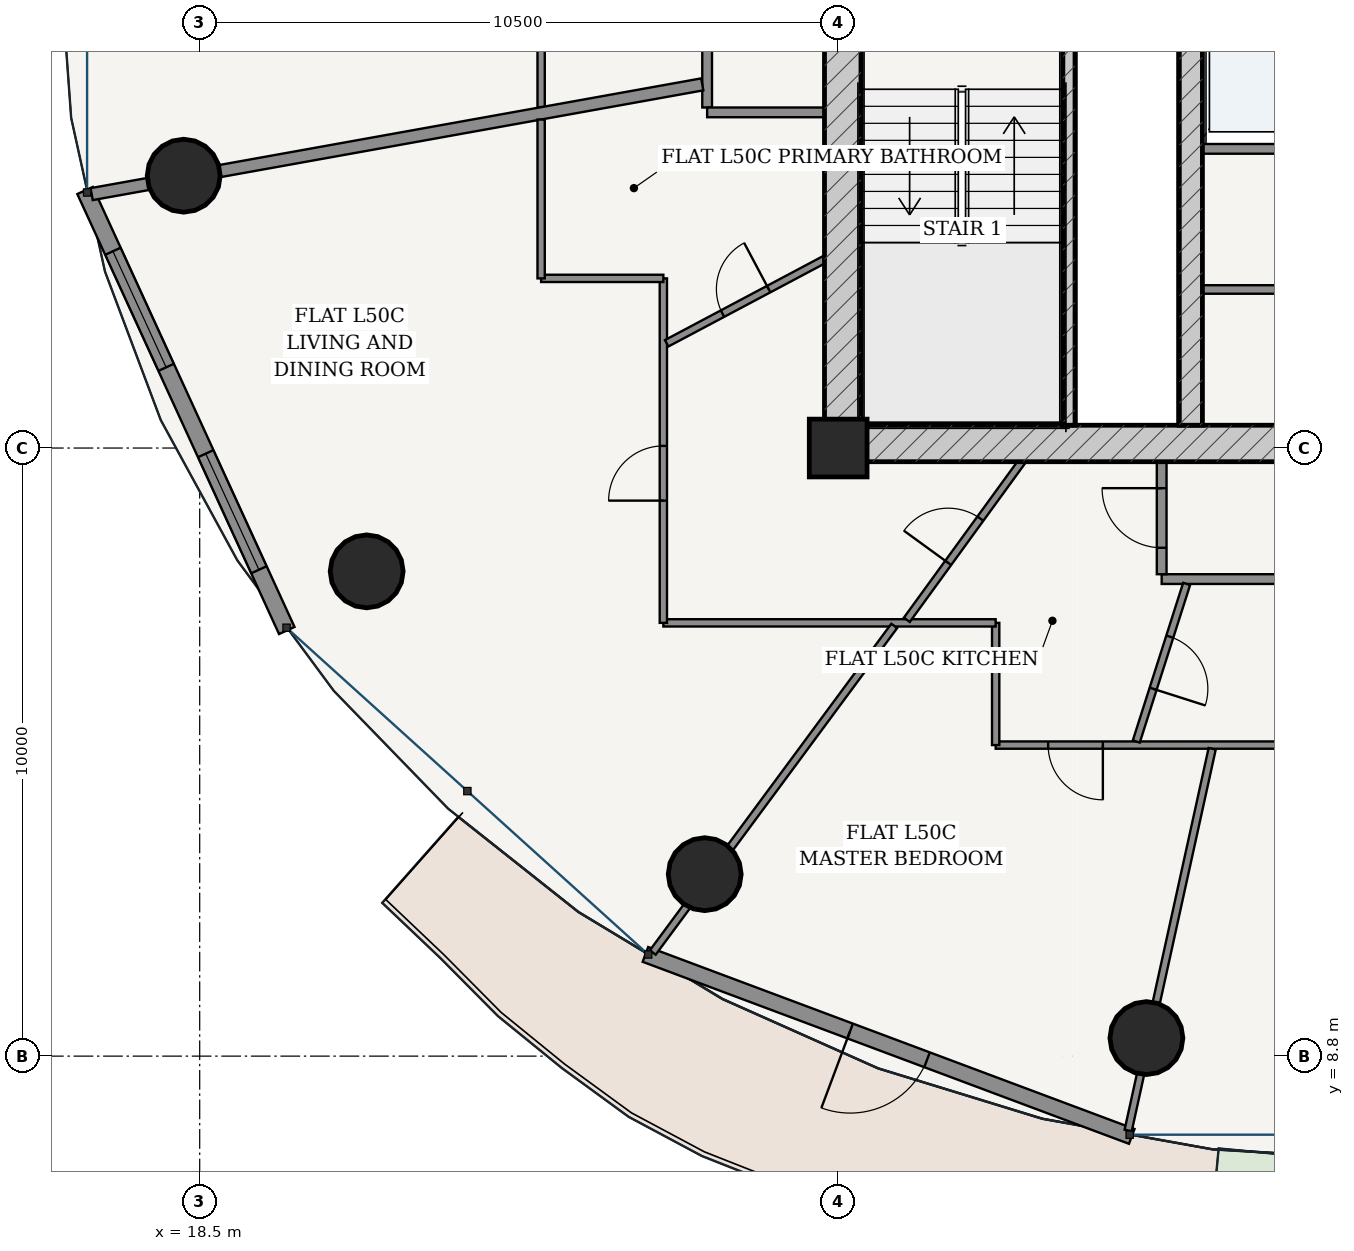
"""IFC4 building model, lengths in metres.
Left out: names, types, materials, properties, quantities, classifications, styles, units other than length and angle.
Written with IfcOpenShell. Run it as: python <this file> out.ifc"""

import sys

from ifc_helpers import new_model, si_unit, direction, frame, frame_2d, origin, origin_2d, place, context, subcontext, project, spatial, rectangle, hollow_circle, extrude, source, transform, mapped, element, fill, save


model = new_model("IFC4")
c1 = context("Model", 3, precision=1e-05, world=origin(), true_north=direction((-0.2419218956, 0.970295726276)))
c2 = subcontext(c1, "Body", "Model", "MODEL_VIEW")
j1 = project(units=[si_unit("LENGTHUNIT", "METRE"), si_unit("PLANEANGLEUNIT", "RADIAN")], contexts=[c1])
p1 = place(None, origin())
s1 = spatial("IfcSite", under=j1, at=p1, CompositionType="ELEMENT")
p2 = place(p1, origin())
s2 = spatial("IfcBuilding", under=s1, at=p2, CompositionType="ELEMENT")
p3 = place(p2, frame((0.0, 0.0, 191.2)))
s3 = spatial("IfcBuildingStorey", under=s2, at=p3, CompositionType="ELEMENT", Elevation=191.2)
p4 = place(p3, frame((29.0, 18.8, 0.0), z_axis=(0.0, 0.0, 1.0), x_axis=(1.0, 0.0, 0.0)))
e1 = element("IfcColumn", 1, at=p4, inside=s3, PredefinedType="COLUMN", context=c2, shape_type="SweptSolid", body=[
    extrude(rectangle(XDim=0.95, YDim=0.95, at=origin_2d()), origin(), (0.0, 0.0, 1.0), 3.7),
])
p5 = place(p3, frame((28.775, 18.875, 0.0), z_axis=(0.0, 0.0, 1.0), x_axis=(1.0, 0.0, 0.0)))
e2 = element("IfcWall", 2, at=p5, inside=s3, PredefinedType="SHEAR", context=c2, shape_type="SweptSolid", body=[
    extrude(rectangle(XDim=18.45, YDim=0.6, at=frame_2d((9.225, 0.0))), origin(), (0.0, 0.0, 1.0), 3.435),
])
p6 = place(p5, frame((8.8, 0.0, 0.0)))
e3 = element("IfcOpeningElement", 3, at=p6, cuts=e2, PredefinedType="OPENING", context=c2, shape_type="SweptSolid", body=[
    extrude(rectangle(XDim=0.85, YDim=2.1, at=frame_2d((0.425, 1.05))), frame((0.0, 0.31, 0.0), z_axis=(0.0, -1.0, 0.0), x_axis=(1.0, 0.0, 0.0)), (0.0, 0.0, 1.0), 0.62),
])
p7 = place(p3, frame((29.075, 19.175, 0.0), z_axis=(0.0, 0.0, 1.0), x_axis=(0.0, 1.0, 0.0)))
e4 = element("IfcWall", 4, at=p7, inside=s3, PredefinedType="SHEAR", context=c2, shape_type="SweptSolid", body=[
    extrude(rectangle(XDim=15.25, YDim=0.6, at=frame_2d((7.625, 0.0))), origin(), (0.0, 0.0, 1.0), 3.435),
])
p8 = place(p7, frame((9.875, 0.0, 0.0)))
e5 = element("IfcOpeningElement", 5, at=p8, cuts=e4, PredefinedType="OPENING", context=c2, shape_type="SweptSolid", body=[
    extrude(rectangle(XDim=1.5, YDim=2.2, at=frame_2d((0.75, 1.1))), frame((0.0, 0.31, 0.0), z_axis=(0.0, -1.0, 0.0), x_axis=(1.0, 0.0, 0.0)), (0.0, 0.0, 1.0), 0.62),
])
p9 = place(p3, frame((32.795, 19.175, 0.0), z_axis=(0.0, 0.0, 1.0), x_axis=(0.0, 1.0, 0.0)))
e6 = element("IfcWall", 6, at=p9, inside=s3, PredefinedType="SOLIDWALL", context=c2, shape_type="SweptSolid", body=[
    extrude(rectangle(XDim=7.375, YDim=0.2, at=frame_2d((3.688, 0.0))), origin(), (0.0, 0.0, 1.0), 3.435),
])
p10 = place(p3, frame((34.8, 19.175, 0.0), z_axis=(0.0, 0.0, 1.0), x_axis=(0.0, 1.0, 0.0)))
e7 = element("IfcWall", 7, at=p10, inside=s3, PredefinedType="SHEAR", context=c2, shape_type="SweptSolid", body=[
    extrude(rectangle(XDim=15.25, YDim=0.38, at=frame_2d((7.625, 0.0))), origin(), (0.0, 0.0, 1.0), 3.435),
])
p11 = place(p10, frame((7.8, 0.0, 0.0)))
e8 = element("IfcOpeningElement", 8, at=p11, cuts=e7, PredefinedType="OPENING", context=c2, shape_type="SweptSolid", body=[
    extrude(rectangle(XDim=1.05, YDim=2.15, at=frame_2d((0.525, 1.075))), frame((0.0, 0.2, 0.0), z_axis=(0.0, -1.0, 0.0), x_axis=(1.0, 0.0, 0.0)), (0.0, 0.0, 1.0), 0.4),
])
for number, where, z_axis, x_axis in (
    (9, (18.237, 23.279, 0.0), (0.0, 0.0, 1.0), (1.0, 0.0, 0.0)),
    (10, (21.246, 16.772, 0.0), (0.0, 0.0, 1.0), (1.0, 0.0, 0.0)),
    (11, (26.805, 11.792, 0.0), (0.0, 0.0, 1.0), (1.0, 0.0, 0.0)),
    (12, (34.069, 9.097, 0.0), (0.0, 0.0, 1.0), (1.0, 0.0, 0.0)),
):
    element("IfcColumn", number, at=place(p3, frame(where, z_axis=z_axis, x_axis=x_axis)), inside=s3, PredefinedType="COLUMN", context=c2, shape_type="SweptSolid", body=[
        extrude(hollow_circle(Radius=0.6, WallThickness=0.038, at=origin_2d()), origin(), (0.0, 0.0, 1.0), 3.7),
    ])
p12 = place(p3, frame((16.615, 23.035, 0.0), z_axis=(0.0, 0.0, 1.0), x_axis=(0.416717018135, -0.909036262641, 0.0)))
e13 = element("IfcWall", 13, at=p12, inside=s3, PredefinedType="SOLIDWALL", context=c2, shape_type="SweptSolid", body=[
    extrude(rectangle(XDim=7.96, YDim=0.28, at=frame_2d((3.98, 0.0))), origin(), (0.0, 0.0, 1.0), 3.435),
])
p13 = place(p12, frame((1.099, 0.0, 0.85)))
e14 = element("IfcOpeningElement", 14, at=p13, cuts=e13, PredefinedType="OPENING", context=c2, shape_type="SweptSolid", body=[
    extrude(rectangle(XDim=2.1, YDim=1.95, at=frame_2d((1.05, 0.975))), frame((0.0, 0.15, 0.0), z_axis=(0.0, -1.0, 0.0), x_axis=(1.0, 0.0, 0.0)), (0.0, 0.0, 1.0), 0.3),
])
p14 = place(p12, frame((4.761, 0.0, 0.85)))
e15 = element("IfcOpeningElement", 15, at=p14, cuts=e13, PredefinedType="OPENING", context=c2, shape_type="SweptSolid", body=[
    extrude(rectangle(XDim=2.1, YDim=1.95, at=frame_2d((1.05, 0.975))), frame((0.0, 0.15, 0.0), z_axis=(0.0, -1.0, 0.0), x_axis=(1.0, 0.0, 0.0)), (0.0, 0.0, 1.0), 0.3),
])
p15 = place(p3, frame((25.83, 10.473, 0.0), z_axis=(0.0, 0.0, 1.0), x_axis=(0.936556918375, -0.350515532672, 0.0)))
e16 = element("IfcWall", 16, at=p15, inside=s3, PredefinedType="SOLIDWALL", context=c2, shape_type="SweptSolid", body=[
    extrude(rectangle(XDim=8.539, YDim=0.26, at=frame_2d((4.27, 0.0))), origin(), (0.0, 0.0, 1.0), 3.435),
])
p16 = place(p15, frame((3.594, 0.0, 0.0)))
e17 = element("IfcOpeningElement", 17, at=p16, cuts=e16, PredefinedType="OPENING", context=c2, shape_type="SweptSolid", body=[
    extrude(rectangle(XDim=1.35, YDim=2.2, at=frame_2d((0.675, 1.1))), frame((0.0, 0.14, 0.0), z_axis=(0.0, -1.0, 0.0), x_axis=(1.0, 0.0, 0.0)), (0.0, 0.0, 1.0), 0.28),
])
p17 = place(p3, frame((34.99, 23.72, 0.0), z_axis=(0.0, 0.0, 1.0), x_axis=(1.0, 0.0, 0.0)))
e18 = element("IfcWall", 18, at=p17, inside=s3, PredefinedType="PARTITIONING", context=c2, shape_type="SweptSolid", body=[
    extrude(rectangle(XDim=6.02, YDim=0.16, at=frame_2d((3.01, 0.0))), origin(), (0.0, 0.0, 1.0), 3.435),
])
p18 = place(p3, frame((34.99, 21.407, 0.0), z_axis=(0.0, 0.0, 1.0), x_axis=(1.0, 0.0, 0.0)))
e19 = element("IfcWall", 19, at=p18, inside=s3, PredefinedType="PARTITIONING", context=c2, shape_type="SweptSolid", body=[
    extrude(rectangle(XDim=6.02, YDim=0.14, at=frame_2d((3.01, 0.0))), origin(), (0.0, 0.0, 1.0), 3.435),
])
p19 = place(p18, frame((2.585, 0.0, 0.0)))
e20 = element("IfcOpeningElement", 20, at=p19, cuts=e19, PredefinedType="OPENING", context=c2, shape_type="SweptSolid", body=[
    extrude(rectangle(XDim=0.85, YDim=2.1, at=frame_2d((0.425, 1.05))), frame((0.0, 0.08, 0.0), z_axis=(0.0, -1.0, 0.0), x_axis=(1.0, 0.0, 0.0)), (0.0, 0.0, 1.0), 0.16),
])
p20 = place(p3, frame((26.845, 24.4, 0.0), z_axis=(0.0, 0.0, 1.0), x_axis=(0.0, 1.0, 0.0)))
e21 = element("IfcWall", 21, at=p20, inside=s3, PredefinedType="PARTITIONING", context=c2, shape_type="SweptSolid", body=[
    extrude(rectangle(XDim=10.625, YDim=0.16, at=frame_2d((5.312, 0.0))), origin(), (0.0, 0.0, 1.0), 2.951),
])
p21 = place(p3, frame((26.845, 24.32, 0.0), z_axis=(0.0, 0.0, 1.0), x_axis=(1.0, 0.0, 0.0)))
e22 = element("IfcWall", 22, at=p21, inside=s3, PredefinedType="PARTITIONING", context=c2, shape_type="SweptSolid", body=[
    extrude(rectangle(XDim=1.93, YDim=0.16, at=frame_2d((0.965, 0.0))), origin(), (0.0, 0.0, 1.0), 3.435),
])
p22 = place(p3, frame((34.32, 16.645, 0.0), z_axis=(0.0, 0.0, 1.0), x_axis=(1.0, 0.0, 0.0)))
e23 = element("IfcWall", 23, at=p22, inside=s3, PredefinedType="PARTITIONING", context=c2, shape_type="SweptSolid", body=[
    extrude(rectangle(XDim=14.835, YDim=0.16, at=frame_2d((7.417, 0.0))), origin(), (0.0, 0.0, 1.0), 2.951),
])
p23 = place(p22, frame((11.961, 0.0, 0.0)))
e24 = element("IfcOpeningElement", 24, at=p23, cuts=e23, PredefinedType="OPENING", context=c2, shape_type="SweptSolid", body=[
    extrude(rectangle(XDim=0.98, YDim=2.2, at=frame_2d((0.49, 1.1))), frame((0.0, 0.09, 0.0), z_axis=(0.0, -1.0, 0.0), x_axis=(1.0, 0.0, 0.0)), (0.0, 0.0, 1.0), 0.18),
])
p24 = place(p3, frame((34.32, 16.725, 0.0), z_axis=(0.0, 0.0, 1.0), x_axis=(0.0, 1.0, 0.0)))
e25 = element("IfcWall", 25, at=p24, inside=s3, PredefinedType="PARTITIONING", context=c2, shape_type="SweptSolid", body=[
    extrude(rectangle(XDim=1.85, YDim=0.16, at=frame_2d((0.925, 0.0))), origin(), (0.0, 0.0, 1.0), 3.435),
])
p25 = place(p24, frame((0.435, 0.0, 0.0)))
e26 = element("IfcOpeningElement", 26, at=p25, cuts=e25, PredefinedType="OPENING", context=c2, shape_type="SweptSolid", body=[
    extrude(rectangle(XDim=0.98, YDim=2.2, at=frame_2d((0.49, 1.1))), frame((0.0, 0.09, 0.0), z_axis=(0.0, -1.0, 0.0), x_axis=(1.0, 0.0, 0.0)), (0.0, 0.0, 1.0), 0.18),
])
p26 = place(p3, frame((24.115, 24.406, 0.0), z_axis=(0.0, 0.0, 1.0), x_axis=(0.0, 1.0, 0.0)))
e27 = element("IfcWall", 27, at=p26, inside=s3, PredefinedType="PARTITIONING", context=c2, shape_type="SweptSolid", body=[
    extrude(rectangle(XDim=13.429, YDim=0.12, at=frame_2d((6.714, 0.0))), origin(), (0.0, 0.0, 1.0), 2.951),
])
p27 = place(p26, frame((9.641, 0.0, 0.0)))
e28 = element("IfcOpeningElement", 28, at=p27, cuts=e27, PredefinedType="OPENING", context=c2, shape_type="SweptSolid", body=[
    extrude(rectangle(XDim=0.9, YDim=2.15, at=frame_2d((0.45, 1.075))), frame((0.0, 0.07, 0.0), z_axis=(0.0, -1.0, 0.0), x_axis=(1.0, 0.0, 0.0)), (0.0, 0.0, 1.0), 0.14),
])
p28 = place(p3, frame((26.765, 24.781, 0.0), z_axis=(0.0, 0.0, 1.0), x_axis=(-0.984226684914, -0.176911934879, 0.0)))
e29 = element("IfcWall", 29, at=p28, inside=s3, PredefinedType="PARTITIONING", context=c2, shape_type="SweptSolid", body=[
    extrude(rectangle(XDim=10.202, YDim=0.2, at=frame_2d((5.101, 0.0))), origin(), (0.0, 0.0, 1.0), 2.951),
])
p29 = place(p3, frame((40.734, 13.915, 0.0), z_axis=(0.0, 0.0, 1.0), x_axis=(-1.0, 0.0, 0.0)))
e30 = element("IfcWall", 30, at=p29, inside=s3, PredefinedType="PARTITIONING", context=c2, shape_type="SweptSolid", body=[
    extrude(rectangle(XDim=9.144, YDim=0.12, at=frame_2d((4.572, 0.0))), origin(), (0.0, 0.0, 1.0), 2.951),
])
p30 = place(p29, frame((7.381, 0.0, 0.0)))
e31 = element("IfcOpeningElement", 31, at=p30, cuts=e30, PredefinedType="OPENING", context=c2, shape_type="SweptSolid", body=[
    extrude(rectangle(XDim=0.9, YDim=2.15, at=frame_2d((0.45, 1.075))), frame((0.0, 0.07, 0.0), z_axis=(0.0, -1.0, 0.0), x_axis=(1.0, 0.0, 0.0)), (0.0, 0.0, 1.0), 0.14),
])
p31 = place(p29, frame((2.458, 0.0, 0.0)))
e32 = element("IfcOpeningElement", 32, at=p31, cuts=e30, PredefinedType="OPENING", context=c2, shape_type="SweptSolid", body=[
    extrude(rectangle(XDim=0.9, YDim=2.15, at=frame_2d((0.45, 1.075))), frame((0.0, 0.07, 0.0), z_axis=(0.0, -1.0, 0.0), x_axis=(1.0, 0.0, 0.0)), (0.0, 0.0, 1.0), 0.14),
])
p32 = place(p3, frame((31.59, 13.915, 0.0), z_axis=(0.0, 0.0, 1.0), x_axis=(0.0, 1.0, 0.0)))
e33 = element("IfcWall", 33, at=p32, inside=s3, PredefinedType="PARTITIONING", context=c2, shape_type="SweptSolid", body=[
    extrude(rectangle(XDim=2.01, YDim=0.12, at=frame_2d((1.005, 0.0))), origin(), (0.0, 0.0, 1.0), 3.11),
])
p33 = place(p3, frame((31.59, 15.925, 0.0), z_axis=(0.0, 0.0, 1.0), x_axis=(-1.0, 0.0, 0.0)))
e34 = element("IfcWall", 34, at=p33, inside=s3, PredefinedType="PARTITIONING", context=c2, shape_type="SweptSolid", body=[
    extrude(rectangle(XDim=5.465, YDim=0.12, at=frame_2d((2.732, 0.0))), origin(), (0.0, 0.0, 1.0), 2.951),
])
p34 = place(p3, frame((26.125, 15.925, 0.0), z_axis=(0.0, 0.0, 1.0), x_axis=(0.0, 1.0, 0.0)))
e35 = element("IfcWall", 35, at=p34, inside=s3, PredefinedType="PARTITIONING", context=c2, shape_type="SweptSolid", body=[
    extrude(rectangle(XDim=5.665, YDim=0.12, at=frame_2d((2.833, 0.0))), origin(), (0.0, 0.0, 1.0), 2.951),
])
p35 = place(p34, frame((2.01, 0.0, 0.0)))
e36 = element("IfcOpeningElement", 36, at=p35, cuts=e35, PredefinedType="OPENING", context=c2, shape_type="SweptSolid", body=[
    extrude(rectangle(XDim=0.9, YDim=2.15, at=frame_2d((0.45, 1.075))), frame((0.0, 0.07, 0.0), z_axis=(0.0, -1.0, 0.0), x_axis=(1.0, 0.0, 0.0)), (0.0, 0.0, 1.0), 0.14),
])
p36 = place(p3, frame((26.125, 21.59, 0.0), z_axis=(0.0, 0.0, 1.0), x_axis=(-1.0, 0.0, 0.0)))
e37 = element("IfcWall", 37, at=p36, inside=s3, PredefinedType="PARTITIONING", context=c2, shape_type="SweptSolid", body=[
    extrude(rectangle(XDim=2.01, YDim=0.12, at=frame_2d((1.005, 0.0))), origin(), (0.0, 0.0, 1.0), 3.11),
])
p37 = place(p3, frame((24.115, 21.59, 0.0), z_axis=(0.0, 0.0, 1.0), x_axis=(0.0, 1.0, 0.0)))
e38 = element("IfcWall", 38, at=p37, inside=s3, PredefinedType="PARTITIONING", context=c2, shape_type="SweptSolid", body=[
    extrude(rectangle(XDim=2.612, YDim=0.12, at=frame_2d((1.306, 0.0))), origin(), (0.0, 0.0, 1.0), 3.11),
])
p38 = place(p3, frame((29.922, 15.875, 0.0), z_axis=(0.0, 0.0, 1.0), x_axis=(-0.594524636617, -0.804077394568, 0.0)))
e39 = element("IfcWall", 39, at=p38, inside=s3, PredefinedType="PARTITIONING", context=c2, shape_type="SweptSolid", body=[
    extrude(rectangle(XDim=6.68, YDim=0.12, at=frame_2d((3.34, 0.0))), origin(), (0.0, 0.0, 1.0), 2.951),
])
p39 = place(p3, frame((35.15, 13.854, 0.0), z_axis=(0.0, 0.0, 1.0), x_axis=(-0.214942949264, -0.976626606519, 0.0)))
e40 = element("IfcWall", 40, at=p39, inside=s3, PredefinedType="PARTITIONING", context=c2, shape_type="SweptSolid", body=[
    extrude(rectangle(XDim=6.427, YDim=0.12, at=frame_2d((3.213, 0.0))), origin(), (0.0, 0.0, 1.0), 2.951),
])
p40 = place(p3, frame((28.775, 21.901, 0.0), z_axis=(0.0, 0.0, 1.0), x_axis=(-0.883156592468, -0.46907828044, 0.0)))
e41 = element("IfcWall", 41, at=p40, inside=s3, PredefinedType="PARTITIONING", context=c2, shape_type="SweptSolid", body=[
    extrude(rectangle(XDim=2.938, YDim=0.12, at=frame_2d((1.469, 0.0))), origin(), (0.0, 0.0, 1.0), 3.435),
])
p41 = place(p40, frame((1.039, 0.0, 0.0)))
e42 = element("IfcOpeningElement", 42, at=p41, cuts=e41, PredefinedType="OPENING", context=c2, shape_type="SweptSolid", body=[
    extrude(rectangle(XDim=0.86, YDim=2.15, at=frame_2d((0.43, 1.075))), frame((0.0, 0.07, 0.0), z_axis=(0.0, -1.0, 0.0), x_axis=(1.0, 0.0, 0.0)), (0.0, 0.0, 1.0), 0.14),
])
p42 = place(p3, frame((32.019, 18.575, 0.0), z_axis=(0.0, 0.0, 1.0), x_axis=(-0.588135570825, -0.808762357143, 0.0)))
e43 = element("IfcWall", 43, at=p42, inside=s3, PredefinedType="PARTITIONING", context=c2, shape_type="SweptSolid", body=[
    extrude(rectangle(XDim=3.215, YDim=0.12, at=frame_2d((1.607, 0.0))), origin(), (0.0, 0.0, 1.0), 3.435),
])
p43 = place(p42, frame((1.157, 0.0, 0.0)))
e44 = element("IfcOpeningElement", 44, at=p43, cuts=e43, PredefinedType="OPENING", context=c2, shape_type="SweptSolid", body=[
    extrude(rectangle(XDim=0.9, YDim=2.15, at=frame_2d((0.45, 1.075))), frame((0.0, 0.07, 0.0), z_axis=(0.0, -1.0, 0.0), x_axis=(1.0, 0.0, 0.0)), (0.0, 0.0, 1.0), 0.14),
])
p44 = place(p3, frame((34.73, 16.565, 0.0), z_axis=(0.0, 0.0, 1.0), x_axis=(-0.304300161081, -0.952576197459, 0.0)))
e45 = element("IfcWall", 45, at=p44, inside=s3, PredefinedType="PARTITIONING", context=c2, shape_type="SweptSolid", body=[
    extrude(rectangle(XDim=2.72, YDim=0.12, at=frame_2d((1.36, 0.0))), origin(), (0.0, 0.0, 1.0), 3.11),
])
p45 = place(p44, frame((0.91, 0.0, 0.0)))
e46 = element("IfcOpeningElement", 46, at=p45, cuts=e45, PredefinedType="OPENING", context=c2, shape_type="SweptSolid", body=[
    extrude(rectangle(XDim=0.9, YDim=2.15, at=frame_2d((0.45, 1.075))), frame((0.0, 0.07, 0.0), z_axis=(0.0, -1.0, 0.0), x_axis=(1.0, 0.0, 0.0)), (0.0, 0.0, 1.0), 0.14),
])
m1 = source(origin(), c2, "Body", "SweptSolid", [
    extrude(rectangle(XDim=2.1, YDim=1.95, at=frame_2d((1.05, 0.975))), frame((0.0, 0.03, 0.0), z_axis=(0.0, -1.0, 0.0), x_axis=(1.0, 0.0, 0.0)), (0.0, 0.0, 1.0), 0.06),
])
p46 = place(p13, origin())
e47 = element("IfcWindow", 47, at=p46, inside=s3, PartitioningType="SINGLE_PANEL", PredefinedType="WINDOW", context=c2, shape_type="MappedRepresentation", body=[
    mapped(m1, transform((0.0, 0.0, 0.0), scale=1.0)),
])
fill(e14, e47)
p47 = place(p14, origin())
e48 = element("IfcWindow", 48, at=p47, inside=s3, PartitioningType="SINGLE_PANEL", PredefinedType="WINDOW", context=c2, shape_type="MappedRepresentation", body=[
    mapped(m1, transform((0.0, 0.0, 0.0), scale=1.0)),
])
fill(e15, e48)
m2 = source(origin(), c2, "Body", "SweptSolid", [
    extrude(rectangle(XDim=1.35, YDim=2.2, at=frame_2d((0.675, 1.1))), frame((0.0, 0.025, 0.0), z_axis=(0.0, -1.0, 0.0), x_axis=(1.0, 0.0, 0.0)), (0.0, 0.0, 1.0), 0.05),
])
p48 = place(p16, frame((1.35, 0.0, 0.0), z_axis=(0.0, 0.0, 1.0), x_axis=(-1.0, 0.0, 0.0)))
e49 = element("IfcDoor", 49, at=p48, inside=s3, OperationType="SINGLE_SWING_RIGHT", PredefinedType="DOOR", context=c2, shape_type="MappedRepresentation", body=[
    mapped(m2, transform((0.0, 0.0, 0.0), scale=1.0)),
])
fill(e17, e49)
m3 = source(origin(), c2, "Body", "SweptSolid", [
    extrude(rectangle(XDim=0.98, YDim=2.2, at=frame_2d((0.49, 1.1))), frame((0.0, 0.025, 0.0), z_axis=(0.0, -1.0, 0.0), x_axis=(1.0, 0.0, 0.0)), (0.0, 0.0, 1.0), 0.05),
])
p49 = place(p25, origin())
e50 = element("IfcDoor", 50, at=p49, inside=s3, OperationType="SINGLE_SWING_RIGHT", PredefinedType="DOOR", context=c2, shape_type="MappedRepresentation", body=[
    mapped(m3, transform((0.0, 0.0, 0.0), scale=1.0)),
])
fill(e26, e50)
m4 = source(origin(), c2, "Body", "SweptSolid", [
    extrude(rectangle(XDim=0.9, YDim=2.15, at=frame_2d((0.45, 1.075))), frame((0.0, 0.025, 0.0), z_axis=(0.0, -1.0, 0.0), x_axis=(1.0, 0.0, 0.0)), (0.0, 0.0, 1.0), 0.05),
])
p50 = place(p43, frame((0.9, 0.0, 0.0), z_axis=(0.0, 0.0, 1.0), x_axis=(-1.0, 0.0, 0.0)))
e51 = element("IfcDoor", 51, at=p50, inside=s3, OperationType="SINGLE_SWING_LEFT", PredefinedType="DOOR", context=c2, shape_type="MappedRepresentation", body=[
    mapped(m4, transform((0.0, 0.0, 0.0), scale=1.0)),
])
fill(e44, e51)
p51 = place(p45, origin())
e52 = element("IfcDoor", 52, at=p51, inside=s3, OperationType="SINGLE_SWING_RIGHT", PredefinedType="DOOR", context=c2, shape_type="MappedRepresentation", body=[
    mapped(m4, transform((0.0, 0.0, 0.0), scale=1.0)),
])
fill(e46, e52)
p52 = place(p30, origin())
e53 = element("IfcDoor", 53, at=p52, inside=s3, OperationType="SINGLE_SWING_LEFT", PredefinedType="DOOR", context=c2, shape_type="MappedRepresentation", body=[
    mapped(m4, transform((0.0, 0.0, 0.0), scale=1.0)),
])
fill(e31, e53)
m5 = source(origin(), c2, "Body", "SweptSolid", [
    extrude(rectangle(XDim=0.86, YDim=2.15, at=frame_2d((0.43, 1.075))), frame((0.0, 0.025, 0.0), z_axis=(0.0, -1.0, 0.0), x_axis=(1.0, 0.0, 0.0)), (0.0, 0.0, 1.0), 0.05),
])
p53 = place(p41, frame((0.86, 0.0, 0.0), z_axis=(0.0, 0.0, 1.0), x_axis=(-1.0, 0.0, 0.0)))
e54 = element("IfcDoor", 54, at=p53, inside=s3, OperationType="SINGLE_SWING_RIGHT", PredefinedType="DOOR", context=c2, shape_type="MappedRepresentation", body=[
    mapped(m5, transform((0.0, 0.0, 0.0), scale=1.0)),
])
fill(e42, e54)
p54 = place(p35, origin())
e55 = element("IfcDoor", 55, at=p54, inside=s3, OperationType="SINGLE_SWING_LEFT", PredefinedType="DOOR", context=c2, shape_type="MappedRepresentation", body=[
    mapped(m4, transform((0.0, 0.0, 0.0), scale=1.0)),
])
fill(e36, e55)
save(model, sys.argv[1])
